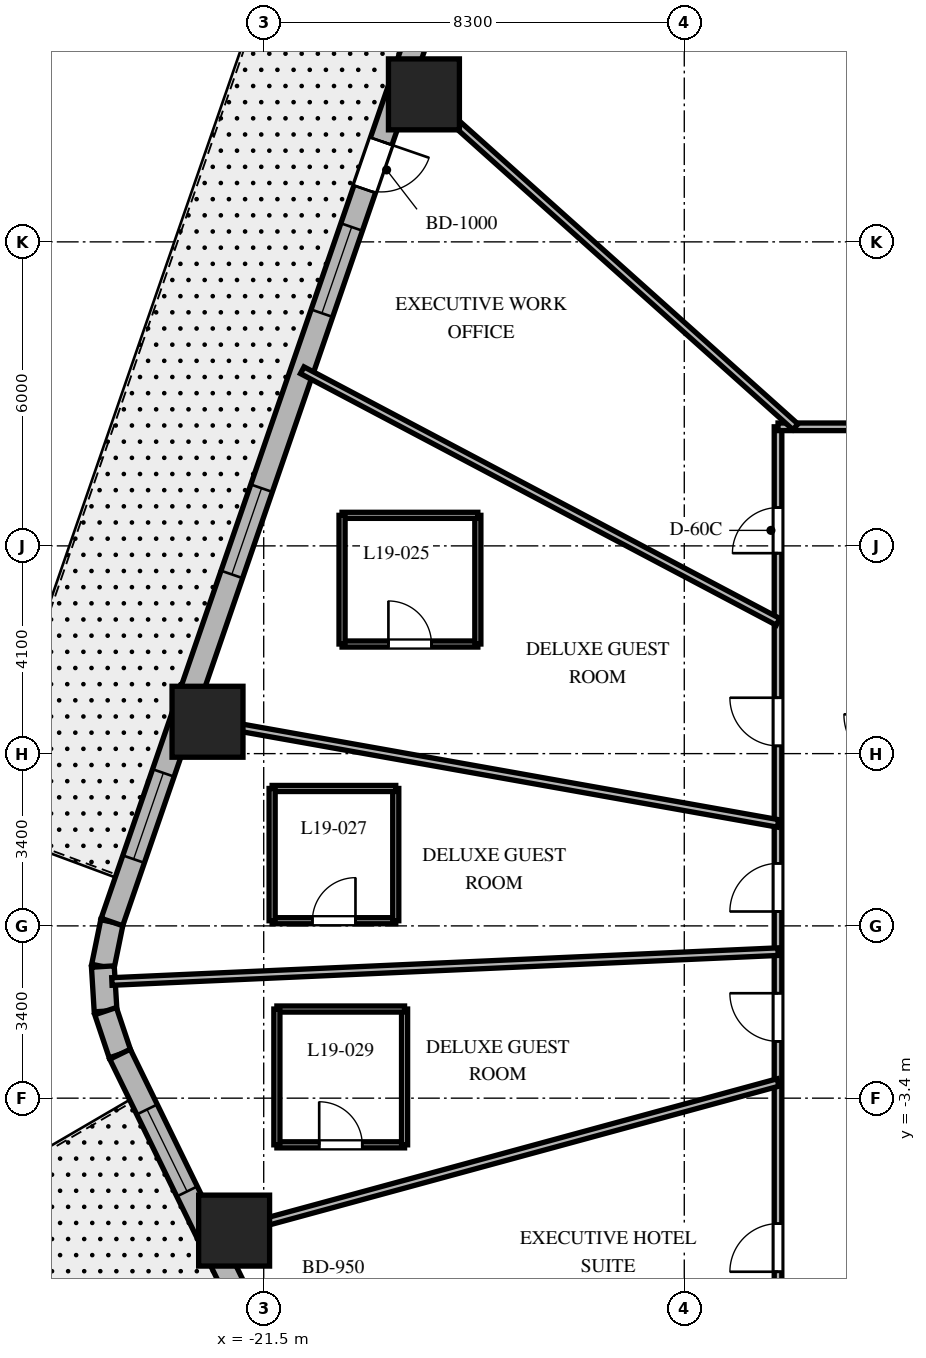
"""IFC4 building model, lengths in metres.
Left out: names, types, materials, properties, quantities, classifications, styles, units other than length and angle.
Written with IfcOpenShell. Run it as: python <this file> out.ifc"""

import sys

from ifc_helpers import new_model, si_unit, direction, frame, frame_2d, origin, origin_2d, place, context, subcontext, project, spatial, rectangle, extrude, element, fill, save


model = new_model("IFC4")
c1 = context("Model", 3, precision=1e-05, world=origin(), true_north=direction((0.0, 1.0)))
c2 = subcontext(c1, "Body", "Model", "MODEL_VIEW")
j1 = project(units=[si_unit("LENGTHUNIT", "METRE"), si_unit("PLANEANGLEUNIT", "RADIAN")], contexts=[c1])
p1 = place(None, origin())
s1 = spatial("IfcSite", under=j1, at=p1, CompositionType="ELEMENT")
p2 = place(p1, origin())
s2 = spatial("IfcBuilding", under=s1, at=p2, CompositionType="ELEMENT")
p3 = place(p2, frame((0.0, 0.0, 82.3)))
s3 = spatial("IfcBuildingStorey", under=s2, at=p3, CompositionType="ELEMENT", Elevation=82.3)
for number, where, z_axis, x_axis in (
    (1, (-18.338, 16.411, 0.0), (0.0, 0.0, 1.0), (1.0, 0.0, 0.0)),
    (2, (-22.609, 4.029, 0.0), (0.0, 0.0, 1.0), (1.0, 0.0, 0.0)),
    (3, (-22.084, -6.014, 0.0), (0.0, 0.0, 1.0), (1.0, 0.0, 0.0)),
):
    element("IfcColumn", number, at=place(p3, frame(where, z_axis=z_axis, x_axis=x_axis)), inside=s3, PredefinedType="COLUMN", context=c2, shape_type="SweptSolid", body=[
        extrude(rectangle(XDim=1.4, YDim=1.4, at=origin_2d()), origin(), (0.0, 0.0, 1.0), 3.7),
    ])
p4 = place(p3, frame((-24.496, 0.077, 0.0), z_axis=(0.0, 0.0, 1.0), x_axis=(-0.199570594521, -0.979883451132, 0.0)))
e4 = element("IfcWall", 4, at=p4, inside=s3, PredefinedType="SOLIDWALL", context=c2, shape_type="SweptSolid", body=[
    extrude(rectangle(XDim=0.897, YDim=0.45, at=frame_2d((0.448, 0.0))), origin(), (0.0, 0.0, 1.0), 3.38),
])
p5 = place(p3, frame((-24.675, -0.802, 0.0), z_axis=(0.0, 0.0, 1.0), x_axis=(0.061188874166, -0.998126205286, 0.0)))
e5 = element("IfcWall", 5, at=p5, inside=s3, PredefinedType="SOLIDWALL", context=c2, shape_type="SweptSolid", body=[
    extrude(rectangle(XDim=0.882, YDim=0.45, at=frame_2d((0.441, 0.0))), origin(), (0.0, 0.0, 1.0), 3.38),
])
p6 = place(p3, frame((-24.621, -1.682, 0.0), z_axis=(0.0, 0.0, 1.0), x_axis=(0.317697451681, -0.948192137278, 0.0)))
e6 = element("IfcWall", 6, at=p6, inside=s3, PredefinedType="SOLIDWALL", context=c2, shape_type="SweptSolid", body=[
    extrude(rectangle(XDim=0.897, YDim=0.45, at=frame_2d((0.448, 0.0))), origin(), (0.0, 0.0, 1.0), 3.38),
])
p7 = place(p3, frame((-17.39, 20.678, 0.0), z_axis=(0.0, 0.0, 1.0), x_axis=(-0.326068018294, -0.945346310854, 0.0)))
e7 = element("IfcWall", 7, at=p7, inside=s3, PredefinedType="SOLIDWALL", context=c2, shape_type="SweptSolid", body=[
    extrude(rectangle(XDim=21.793, YDim=0.45, at=frame_2d((10.896, 0.0))), origin(), (0.0, 0.0, 1.0), 3.38),
])
p8 = place(p7, frame((5.493, 0.0, 0.0)))
e8 = element("IfcOpeningElement", 8, at=p8, cuts=e7, PredefinedType="OPENING", context=c2, shape_type="SweptSolid", body=[
    extrude(rectangle(XDim=1.0, YDim=2.15, at=frame_2d((0.5, 1.075))), frame((0.0, 0.235, 0.0), z_axis=(0.0, -1.0, 0.0), x_axis=(1.0, 0.0, 0.0)), (0.0, 0.0, 1.0), 0.47),
])
p9 = place(p7, frame((1.26, 0.0, 0.8)))
e9 = element("IfcOpeningElement", 9, at=p9, cuts=e7, PredefinedType="OPENING", context=c2, shape_type="SweptSolid", body=[
    extrude(rectangle(XDim=1.8, YDim=1.8, at=frame_2d((0.9, 0.9))), frame((0.0, 0.235, 0.0), z_axis=(0.0, -1.0, 0.0), x_axis=(1.0, 0.0, 0.0)), (0.0, 0.0, 1.0), 0.47),
])
p10 = place(p7, frame((7.283, 0.0, 0.8)))
e10 = element("IfcOpeningElement", 10, at=p10, cuts=e7, PredefinedType="OPENING", context=c2, shape_type="SweptSolid", body=[
    extrude(rectangle(XDim=1.8, YDim=1.8, at=frame_2d((0.9, 0.9))), frame((0.0, 0.235, 0.0), z_axis=(0.0, -1.0, 0.0), x_axis=(1.0, 0.0, 0.0)), (0.0, 0.0, 1.0), 0.47),
])
p11 = place(p7, frame((12.736, 0.0, 0.8)))
e11 = element("IfcOpeningElement", 11, at=p11, cuts=e7, PredefinedType="OPENING", context=c2, shape_type="SweptSolid", body=[
    extrude(rectangle(XDim=1.8, YDim=1.8, at=frame_2d((0.9, 0.9))), frame((0.0, 0.235, 0.0), z_axis=(0.0, -1.0, 0.0), x_axis=(1.0, 0.0, 0.0)), (0.0, 0.0, 1.0), 0.47),
])
p12 = place(p7, frame((18.68, 0.0, 0.8)))
e12 = element("IfcOpeningElement", 12, at=p12, cuts=e7, PredefinedType="OPENING", context=c2, shape_type="SweptSolid", body=[
    extrude(rectangle(XDim=1.8, YDim=1.8, at=frame_2d((0.9, 0.9))), frame((0.0, 0.235, 0.0), z_axis=(0.0, -1.0, 0.0), x_axis=(1.0, 0.0, 0.0)), (0.0, 0.0, 1.0), 0.47),
])
p13 = place(p3, frame((-24.336, -2.532, 0.0), z_axis=(0.0, 0.0, 1.0), x_axis=(0.438931326393, -0.898520612291, 0.0)))
e13 = element("IfcWall", 13, at=p13, inside=s3, PredefinedType="SOLIDWALL", context=c2, shape_type="SweptSolid", body=[
    extrude(rectangle(XDim=20.623, YDim=0.45, at=frame_2d((10.312, 0.0))), origin(), (0.0, 0.0, 1.0), 3.38),
])
p14 = place(p13, frame((5.171, 0.0, 0.0)))
e14 = element("IfcOpeningElement", 14, at=p14, cuts=e13, PredefinedType="OPENING", context=c2, shape_type="SweptSolid", body=[
    extrude(rectangle(XDim=0.95, YDim=2.15, at=frame_2d((0.475, 1.075))), frame((0.0, 0.235, 0.0), z_axis=(0.0, -1.0, 0.0), x_axis=(1.0, 0.0, 0.0)), (0.0, 0.0, 1.0), 0.47),
])
p15 = place(p13, frame((1.214, 0.0, 0.8)))
e15 = element("IfcOpeningElement", 15, at=p15, cuts=e13, PredefinedType="OPENING", context=c2, shape_type="SweptSolid", body=[
    extrude(rectangle(XDim=1.8, YDim=1.8, at=frame_2d((0.9, 0.9))), frame((0.0, 0.235, 0.0), z_axis=(0.0, -1.0, 0.0), x_axis=(1.0, 0.0, 0.0)), (0.0, 0.0, 1.0), 0.47),
])
p16 = place(p13, frame((9.462, 0.0, 0.8)))
e16 = element("IfcOpeningElement", 16, at=p16, cuts=e13, PredefinedType="OPENING", context=c2, shape_type="SweptSolid", body=[
    extrude(rectangle(XDim=1.8, YDim=1.8, at=frame_2d((0.9, 0.9))), frame((0.0, 0.235, 0.0), z_axis=(0.0, -1.0, 0.0), x_axis=(1.0, 0.0, 0.0)), (0.0, 0.0, 1.0), 0.47),
])
p17 = place(p13, frame((17.66, 0.0, 0.8)))
e17 = element("IfcOpeningElement", 17, at=p17, cuts=e13, PredefinedType="OPENING", context=c2, shape_type="SweptSolid", body=[
    extrude(rectangle(XDim=1.8, YDim=1.8, at=frame_2d((0.9, 0.9))), frame((0.0, 0.235, 0.0), z_axis=(0.0, -1.0, 0.0), x_axis=(1.0, 0.0, 0.0)), (0.0, 0.0, 1.0), 0.47),
])
p18 = place(p3, frame((-11.35, -9.85, 0.0), z_axis=(0.0, 0.0, 1.0), x_axis=(0.0, 1.0, 0.0)))
e18 = element("IfcWall", 18, at=p18, inside=s3, PredefinedType="PARTITIONING", context=c2, shape_type="SweptSolid", body=[
    extrude(rectangle(XDim=19.7, YDim=0.15, at=frame_2d((9.85, 0.0))), origin(), (0.0, 0.0, 1.0), 2.82),
])
p19 = place(p18, frame((17.206, 0.0, 0.0)))
e19 = element("IfcOpeningElement", 19, at=p19, cuts=e18, PredefinedType="OPENING", context=c2, shape_type="SweptSolid", body=[
    extrude(rectangle(XDim=0.9, YDim=2.03, at=frame_2d((0.45, 1.015))), frame((0.0, 0.085, 0.0), z_axis=(0.0, -1.0, 0.0), x_axis=(1.0, 0.0, 0.0)), (0.0, 0.0, 1.0), 0.17),
])
p20 = place(p18, frame((13.403, 0.0, 0.0)))
e20 = element("IfcOpeningElement", 20, at=p20, cuts=e18, PredefinedType="OPENING", context=c2, shape_type="SweptSolid", body=[
    extrude(rectangle(XDim=0.95, YDim=2.03, at=frame_2d((0.475, 1.015))), frame((0.0, 0.085, 0.0), z_axis=(0.0, -1.0, 0.0), x_axis=(1.0, 0.0, 0.0)), (0.0, 0.0, 1.0), 0.17),
])
p21 = place(p18, frame((10.134, 0.0, 0.0)))
e21 = element("IfcOpeningElement", 21, at=p21, cuts=e18, PredefinedType="OPENING", context=c2, shape_type="SweptSolid", body=[
    extrude(rectangle(XDim=0.95, YDim=2.03, at=frame_2d((0.475, 1.015))), frame((0.0, 0.085, 0.0), z_axis=(0.0, -1.0, 0.0), x_axis=(1.0, 0.0, 0.0)), (0.0, 0.0, 1.0), 0.17),
])
p22 = place(p18, frame((7.571, 0.0, 0.0)))
e22 = element("IfcOpeningElement", 22, at=p22, cuts=e18, PredefinedType="OPENING", context=c2, shape_type="SweptSolid", body=[
    extrude(rectangle(XDim=0.95, YDim=2.03, at=frame_2d((0.475, 1.015))), frame((0.0, 0.085, 0.0), z_axis=(0.0, -1.0, 0.0), x_axis=(1.0, 0.0, 0.0)), (0.0, 0.0, 1.0), 0.17),
])
p23 = place(p18, frame((3.024, 0.0, 0.0)))
e23 = element("IfcOpeningElement", 23, at=p23, cuts=e18, PredefinedType="OPENING", context=c2, shape_type="SweptSolid", body=[
    extrude(rectangle(XDim=0.95, YDim=2.03, at=frame_2d((0.475, 1.015))), frame((0.0, 0.085, 0.0), z_axis=(0.0, -1.0, 0.0), x_axis=(1.0, 0.0, 0.0)), (0.0, 0.0, 1.0), 0.17),
])
p24 = place(p3, frame((-11.35, 9.85, 0.0), z_axis=(0.0, 0.0, 1.0), x_axis=(1.0, 0.0, 0.0)))
e24 = element("IfcWall", 24, at=p24, inside=s3, PredefinedType="PARTITIONING", context=c2, shape_type="SweptSolid", body=[
    extrude(rectangle(XDim=22.7, YDim=0.15, at=frame_2d((11.35, 0.0))), origin(), (0.0, 0.0, 1.0), 2.82),
])
p25 = place(p24, frame((18.837, 0.0, 0.0)))
e25 = element("IfcOpeningElement", 25, at=p25, cuts=e24, PredefinedType="OPENING", context=c2, shape_type="SweptSolid", body=[
    extrude(rectangle(XDim=0.9, YDim=2.03, at=frame_2d((0.45, 1.015))), frame((0.0, 0.085, 0.0), z_axis=(0.0, -1.0, 0.0), x_axis=(1.0, 0.0, 0.0)), (0.0, 0.0, 1.0), 0.17),
])
p26 = place(p24, frame((15.532, 0.0, 0.0)))
e26 = element("IfcOpeningElement", 26, at=p26, cuts=e24, PredefinedType="OPENING", context=c2, shape_type="SweptSolid", body=[
    extrude(rectangle(XDim=0.95, YDim=2.03, at=frame_2d((0.475, 1.015))), frame((0.0, 0.085, 0.0), z_axis=(0.0, -1.0, 0.0), x_axis=(1.0, 0.0, 0.0)), (0.0, 0.0, 1.0), 0.17),
])
p27 = place(p24, frame((10.444, 0.0, 0.0)))
e27 = element("IfcOpeningElement", 27, at=p27, cuts=e24, PredefinedType="OPENING", context=c2, shape_type="SweptSolid", body=[
    extrude(rectangle(XDim=0.95, YDim=2.03, at=frame_2d((0.475, 1.015))), frame((0.0, 0.085, 0.0), z_axis=(0.0, -1.0, 0.0), x_axis=(1.0, 0.0, 0.0)), (0.0, 0.0, 1.0), 0.17),
])
p28 = place(p24, frame((3.369, 0.0, 0.0)))
e28 = element("IfcOpeningElement", 28, at=p28, cuts=e24, PredefinedType="OPENING", context=c2, shape_type="SweptSolid", body=[
    extrude(rectangle(XDim=0.95, YDim=2.03, at=frame_2d((0.475, 1.015))), frame((0.0, 0.085, 0.0), z_axis=(0.0, -1.0, 0.0), x_axis=(1.0, 0.0, 0.0)), (0.0, 0.0, 1.0), 0.17),
])
p29 = place(p3, frame((-11.007, 9.85, 0.0), z_axis=(0.0, 0.0, 1.0), x_axis=(-0.745177305978, 0.666866390407, 0.0)))
e29 = element("IfcWall", 29, at=p29, inside=s3, PredefinedType="PARTITIONING", context=c2, shape_type="SweptSolid", body=[
    extrude(rectangle(XDim=10.375, YDim=0.15, at=frame_2d((5.188, 0.0))), origin(), (0.0, 0.0, 1.0), 2.52),
])
p30 = place(p3, frame((-11.35, 6.001, 0.0), z_axis=(0.0, 0.0, 1.0), x_axis=(-0.884022077319, 0.467445148453, 0.0)))
e30 = element("IfcWall", 30, at=p30, inside=s3, PredefinedType="PARTITIONING", context=c2, shape_type="SweptSolid", body=[
    extrude(rectangle(XDim=10.621, YDim=0.15, at=frame_2d((5.311, 0.0))), origin(), (0.0, 0.0, 1.0), 2.52),
])
p31 = place(p3, frame((-11.35, 2.023, 0.0), z_axis=(0.0, 0.0, 1.0), x_axis=(-0.984493741877, 0.17541970301, 0.0)))
e31 = element("IfcWall", 31, at=p31, inside=s3, PredefinedType="PARTITIONING", context=c2, shape_type="SweptSolid", body=[
    extrude(rectangle(XDim=11.937, YDim=0.15, at=frame_2d((5.969, 0.0))), origin(), (0.0, 0.0, 1.0), 2.52),
])
p32 = place(p3, frame((-11.35, -0.508, 0.0), z_axis=(0.0, 0.0, 1.0), x_axis=(-0.998998237556, -0.044749540337, 0.0)))
e32 = element("IfcWall", 32, at=p32, inside=s3, PredefinedType="PARTITIONING", context=c2, shape_type="SweptSolid", body=[
    extrude(rectangle(XDim=13.159, YDim=0.15, at=frame_2d((6.58, 0.0))), origin(), (0.0, 0.0, 1.0), 2.52),
])
p33 = place(p3, frame((-11.35, -3.091, 0.0), z_axis=(0.0, 0.0, 1.0), x_axis=(-0.964859685283, -0.262765651704, 0.0)))
e33 = element("IfcWall", 33, at=p33, inside=s3, PredefinedType="PARTITIONING", context=c2, shape_type="SweptSolid", body=[
    extrude(rectangle(XDim=11.629, YDim=0.15, at=frame_2d((5.814, 0.0))), origin(), (0.0, 0.0, 1.0), 2.52),
])
p34 = place(p3, frame((-19.954, 5.563, 0.0), z_axis=(0.0, 0.0, 1.0), x_axis=(1.0, 0.0, 0.0)))
e34 = element("IfcWall", 34, at=p34, inside=s3, PredefinedType="PARTITIONING", context=c2, shape_type="SweptSolid", body=[
    extrude(rectangle(XDim=2.68, YDim=0.12, at=frame_2d((1.34, 0.0))), origin(), (0.0, 0.0, 1.0), 2.82),
])
p35 = place(p34, frame((0.915, 0.0, 0.0)))
e35 = element("IfcOpeningElement", 35, at=p35, cuts=e34, PredefinedType="OPENING", context=c2, shape_type="SweptSolid", body=[
    extrude(rectangle(XDim=0.85, YDim=2.03, at=frame_2d((0.425, 1.015))), frame((0.0, 0.07, 0.0), z_axis=(0.0, -1.0, 0.0), x_axis=(1.0, 0.0, 0.0)), (0.0, 0.0, 1.0), 0.14),
])
p36 = place(p3, frame((-17.274, 5.563, 0.0), z_axis=(0.0, 0.0, 1.0), x_axis=(0.0, 1.0, 0.0)))
e36 = element("IfcWall", 36, at=p36, inside=s3, PredefinedType="PARTITIONING", context=c2, shape_type="SweptSolid", body=[
    extrude(rectangle(XDim=2.54, YDim=0.12, at=frame_2d((1.27, 0.0))), origin(), (0.0, 0.0, 1.0), 2.952),
])
p37 = place(p3, frame((-17.274, 8.103, 0.0), z_axis=(0.0, 0.0, 1.0), x_axis=(-1.0, 0.0, 0.0)))
e37 = element("IfcWall", 37, at=p37, inside=s3, PredefinedType="PARTITIONING", context=c2, shape_type="SweptSolid", body=[
    extrude(rectangle(XDim=2.68, YDim=0.12, at=frame_2d((1.34, 0.0))), origin(), (0.0, 0.0, 1.0), 3.38),
])
p38 = place(p3, frame((-19.954, 8.103, 0.0), z_axis=(0.0, 0.0, 1.0), x_axis=(0.0, -1.0, 0.0)))
e38 = element("IfcWall", 38, at=p38, inside=s3, PredefinedType="PARTITIONING", context=c2, shape_type="SweptSolid", body=[
    extrude(rectangle(XDim=2.54, YDim=0.12, at=frame_2d((1.27, 0.0))), origin(), (0.0, 0.0, 1.0), 3.38),
])
p39 = place(p3, frame((-21.334, 0.102, 0.0), z_axis=(0.0, 0.0, 1.0), x_axis=(1.0, 0.0, 0.0)))
e39 = element("IfcWall", 39, at=p39, inside=s3, PredefinedType="PARTITIONING", context=c2, shape_type="SweptSolid", body=[
    extrude(rectangle(XDim=2.44, YDim=0.12, at=frame_2d((1.22, 0.0))), origin(), (0.0, 0.0, 1.0), 3.38),
])
p40 = place(p39, frame((0.795, 0.0, 0.0)))
e40 = element("IfcOpeningElement", 40, at=p40, cuts=e39, PredefinedType="OPENING", context=c2, shape_type="SweptSolid", body=[
    extrude(rectangle(XDim=0.85, YDim=2.03, at=frame_2d((0.425, 1.015))), frame((0.0, 0.07, 0.0), z_axis=(0.0, -1.0, 0.0), x_axis=(1.0, 0.0, 0.0)), (0.0, 0.0, 1.0), 0.14),
])
p41 = place(p3, frame((-18.894, 0.102, 0.0), z_axis=(0.0, 0.0, 1.0), x_axis=(0.0, 1.0, 0.0)))
e41 = element("IfcWall", 41, at=p41, inside=s3, PredefinedType="PARTITIONING", context=c2, shape_type="SweptSolid", body=[
    extrude(rectangle(XDim=2.61, YDim=0.12, at=frame_2d((1.305, 0.0))), origin(), (0.0, 0.0, 1.0), 3.38),
])
p42 = place(p3, frame((-18.894, 2.712, 0.0), z_axis=(0.0, 0.0, 1.0), x_axis=(-1.0, 0.0, 0.0)))
e42 = element("IfcWall", 42, at=p42, inside=s3, PredefinedType="PARTITIONING", context=c2, shape_type="SweptSolid", body=[
    extrude(rectangle(XDim=2.44, YDim=0.12, at=frame_2d((1.22, 0.0))), origin(), (0.0, 0.0, 1.0), 3.38),
])
p43 = place(p3, frame((-21.334, 2.712, 0.0), z_axis=(0.0, 0.0, 1.0), x_axis=(0.0, -1.0, 0.0)))
e43 = element("IfcWall", 43, at=p43, inside=s3, PredefinedType="PARTITIONING", context=c2, shape_type="SweptSolid", body=[
    extrude(rectangle(XDim=2.61, YDim=0.12, at=frame_2d((1.305, 0.0))), origin(), (0.0, 0.0, 1.0), 3.38),
])
p44 = place(p3, frame((-21.24, -4.321, 0.0), z_axis=(0.0, 0.0, 1.0), x_axis=(1.0, 0.0, 0.0)))
e44 = element("IfcWall", 44, at=p44, inside=s3, PredefinedType="PARTITIONING", context=c2, shape_type="SweptSolid", body=[
    extrude(rectangle(XDim=2.52, YDim=0.12, at=frame_2d((1.26, 0.0))), origin(), (0.0, 0.0, 1.0), 3.38),
])
p45 = place(p44, frame((0.835, 0.0, 0.0)))
e45 = element("IfcOpeningElement", 45, at=p45, cuts=e44, PredefinedType="OPENING", context=c2, shape_type="SweptSolid", body=[
    extrude(rectangle(XDim=0.85, YDim=2.03, at=frame_2d((0.425, 1.015))), frame((0.0, 0.07, 0.0), z_axis=(0.0, -1.0, 0.0), x_axis=(1.0, 0.0, 0.0)), (0.0, 0.0, 1.0), 0.14),
])
p46 = place(p3, frame((-18.72, -4.321, 0.0), z_axis=(0.0, 0.0, 1.0), x_axis=(0.0, 1.0, 0.0)))
e46 = element("IfcWall", 46, at=p46, inside=s3, PredefinedType="PARTITIONING", context=c2, shape_type="SweptSolid", body=[
    extrude(rectangle(XDim=2.68, YDim=0.12, at=frame_2d((1.34, 0.0))), origin(), (0.0, 0.0, 1.0), 3.38),
])
p47 = place(p3, frame((-18.72, -1.641, 0.0), z_axis=(0.0, 0.0, 1.0), x_axis=(-1.0, 0.0, 0.0)))
e47 = element("IfcWall", 47, at=p47, inside=s3, PredefinedType="PARTITIONING", context=c2, shape_type="SweptSolid", body=[
    extrude(rectangle(XDim=2.52, YDim=0.12, at=frame_2d((1.26, 0.0))), origin(), (0.0, 0.0, 1.0), 3.38),
])
p48 = place(p3, frame((-21.24, -1.641, 0.0), z_axis=(0.0, 0.0, 1.0), x_axis=(0.0, -1.0, 0.0)))
e48 = element("IfcWall", 48, at=p48, inside=s3, PredefinedType="PARTITIONING", context=c2, shape_type="SweptSolid", body=[
    extrude(rectangle(XDim=2.68, YDim=0.12, at=frame_2d((1.34, 0.0))), origin(), (0.0, 0.0, 1.0), 3.38),
])
p49 = place(p8, origin())
e49 = element("IfcDoor", 49, at=p49, inside=s3, OperationType="SINGLE_SWING_LEFT", PredefinedType="DOOR", context=c2, shape_type="SweptSolid", body=[
    extrude(rectangle(XDim=1.0, YDim=2.15, at=frame_2d((0.5, 1.075))), frame((0.0, 0.025, 0.0), z_axis=(0.0, -1.0, 0.0), x_axis=(1.0, 0.0, 0.0)), (0.0, 0.0, 1.0), 0.05),
])
fill(e8, e49)
p50 = place(p10, origin())
e50 = element("IfcWindow", 50, at=p50, inside=s3, PartitioningType="SINGLE_PANEL", PredefinedType="WINDOW", context=c2, shape_type="SweptSolid", body=[
    extrude(rectangle(XDim=1.8, YDim=1.8, at=frame_2d((0.9, 0.9))), frame((0.0, 0.03, 0.0), z_axis=(0.0, -1.0, 0.0), x_axis=(1.0, 0.0, 0.0)), (0.0, 0.0, 1.0), 0.06),
])
fill(e10, e50)
p51 = place(p11, origin())
e51 = element("IfcWindow", 51, at=p51, inside=s3, PartitioningType="SINGLE_PANEL", PredefinedType="WINDOW", context=c2, shape_type="SweptSolid", body=[
    extrude(rectangle(XDim=1.8, YDim=1.8, at=frame_2d((0.9, 0.9))), frame((0.0, 0.03, 0.0), z_axis=(0.0, -1.0, 0.0), x_axis=(1.0, 0.0, 0.0)), (0.0, 0.0, 1.0), 0.06),
])
fill(e11, e51)
p52 = place(p12, origin())
e52 = element("IfcWindow", 52, at=p52, inside=s3, PartitioningType="SINGLE_PANEL", PredefinedType="WINDOW", context=c2, shape_type="SweptSolid", body=[
    extrude(rectangle(XDim=1.8, YDim=1.8, at=frame_2d((0.9, 0.9))), frame((0.0, 0.03, 0.0), z_axis=(0.0, -1.0, 0.0), x_axis=(1.0, 0.0, 0.0)), (0.0, 0.0, 1.0), 0.06),
])
fill(e12, e52)
p53 = place(p15, origin())
e53 = element("IfcWindow", 53, at=p53, inside=s3, PartitioningType="SINGLE_PANEL", PredefinedType="WINDOW", context=c2, shape_type="SweptSolid", body=[
    extrude(rectangle(XDim=1.8, YDim=1.8, at=frame_2d((0.9, 0.9))), frame((0.0, 0.03, 0.0), z_axis=(0.0, -1.0, 0.0), x_axis=(1.0, 0.0, 0.0)), (0.0, 0.0, 1.0), 0.06),
])
fill(e15, e53)
p54 = place(p19, origin())
e54 = element("IfcDoor", 54, at=p54, inside=s3, OperationType="SINGLE_SWING_LEFT", PredefinedType="DOOR", context=c2, shape_type="SweptSolid", body=[
    extrude(rectangle(XDim=0.9, YDim=2.03, at=frame_2d((0.45, 1.015))), frame((0.0, 0.025, 0.0), z_axis=(0.0, -1.0, 0.0), x_axis=(1.0, 0.0, 0.0)), (0.0, 0.0, 1.0), 0.05),
])
fill(e19, e54)
p55 = place(p20, origin())
e55 = element("IfcDoor", 55, at=p55, inside=s3, OperationType="SINGLE_SWING_RIGHT", PredefinedType="DOOR", context=c2, shape_type="SweptSolid", body=[
    extrude(rectangle(XDim=0.95, YDim=2.03, at=frame_2d((0.475, 1.015))), frame((0.0, 0.025, 0.0), z_axis=(0.0, -1.0, 0.0), x_axis=(1.0, 0.0, 0.0)), (0.0, 0.0, 1.0), 0.05),
])
fill(e20, e55)
p56 = place(p35, origin())
e56 = element("IfcDoor", 56, at=p56, inside=s3, OperationType="SINGLE_SWING_LEFT", PredefinedType="DOOR", context=c2, shape_type="SweptSolid", body=[
    extrude(rectangle(XDim=0.85, YDim=2.03, at=frame_2d((0.425, 1.015))), frame((0.0, 0.025, 0.0), z_axis=(0.0, -1.0, 0.0), x_axis=(1.0, 0.0, 0.0)), (0.0, 0.0, 1.0), 0.05),
])
fill(e35, e56)
p57 = place(p21, origin())
e57 = element("IfcDoor", 57, at=p57, inside=s3, OperationType="SINGLE_SWING_LEFT", PredefinedType="DOOR", context=c2, shape_type="SweptSolid", body=[
    extrude(rectangle(XDim=0.95, YDim=2.03, at=frame_2d((0.475, 1.015))), frame((0.0, 0.025, 0.0), z_axis=(0.0, -1.0, 0.0), x_axis=(1.0, 0.0, 0.0)), (0.0, 0.0, 1.0), 0.05),
])
fill(e21, e57)
p58 = place(p40, origin())
e58 = element("IfcDoor", 58, at=p58, inside=s3, OperationType="SINGLE_SWING_RIGHT", PredefinedType="DOOR", context=c2, shape_type="SweptSolid", body=[
    extrude(rectangle(XDim=0.85, YDim=2.03, at=frame_2d((0.425, 1.015))), frame((0.0, 0.025, 0.0), z_axis=(0.0, -1.0, 0.0), x_axis=(1.0, 0.0, 0.0)), (0.0, 0.0, 1.0), 0.05),
])
fill(e40, e58)
p59 = place(p22, origin())
e59 = element("IfcDoor", 59, at=p59, inside=s3, OperationType="SINGLE_SWING_RIGHT", PredefinedType="DOOR", context=c2, shape_type="SweptSolid", body=[
    extrude(rectangle(XDim=0.95, YDim=2.03, at=frame_2d((0.475, 1.015))), frame((0.0, 0.025, 0.0), z_axis=(0.0, -1.0, 0.0), x_axis=(1.0, 0.0, 0.0)), (0.0, 0.0, 1.0), 0.05),
])
fill(e22, e59)
p60 = place(p45, origin())
e60 = element("IfcDoor", 60, at=p60, inside=s3, OperationType="SINGLE_SWING_LEFT", PredefinedType="DOOR", context=c2, shape_type="SweptSolid", body=[
    extrude(rectangle(XDim=0.85, YDim=2.03, at=frame_2d((0.425, 1.015))), frame((0.0, 0.025, 0.0), z_axis=(0.0, -1.0, 0.0), x_axis=(1.0, 0.0, 0.0)), (0.0, 0.0, 1.0), 0.05),
])
fill(e45, e60)
p61 = place(p23, origin())
e61 = element("IfcDoor", 61, at=p61, inside=s3, OperationType="SINGLE_SWING_LEFT", PredefinedType="DOOR", context=c2, shape_type="SweptSolid", body=[
    extrude(rectangle(XDim=0.95, YDim=2.03, at=frame_2d((0.475, 1.015))), frame((0.0, 0.025, 0.0), z_axis=(0.0, -1.0, 0.0), x_axis=(1.0, 0.0, 0.0)), (0.0, 0.0, 1.0), 0.05),
])
fill(e23, e61)
save(model, sys.argv[1])
